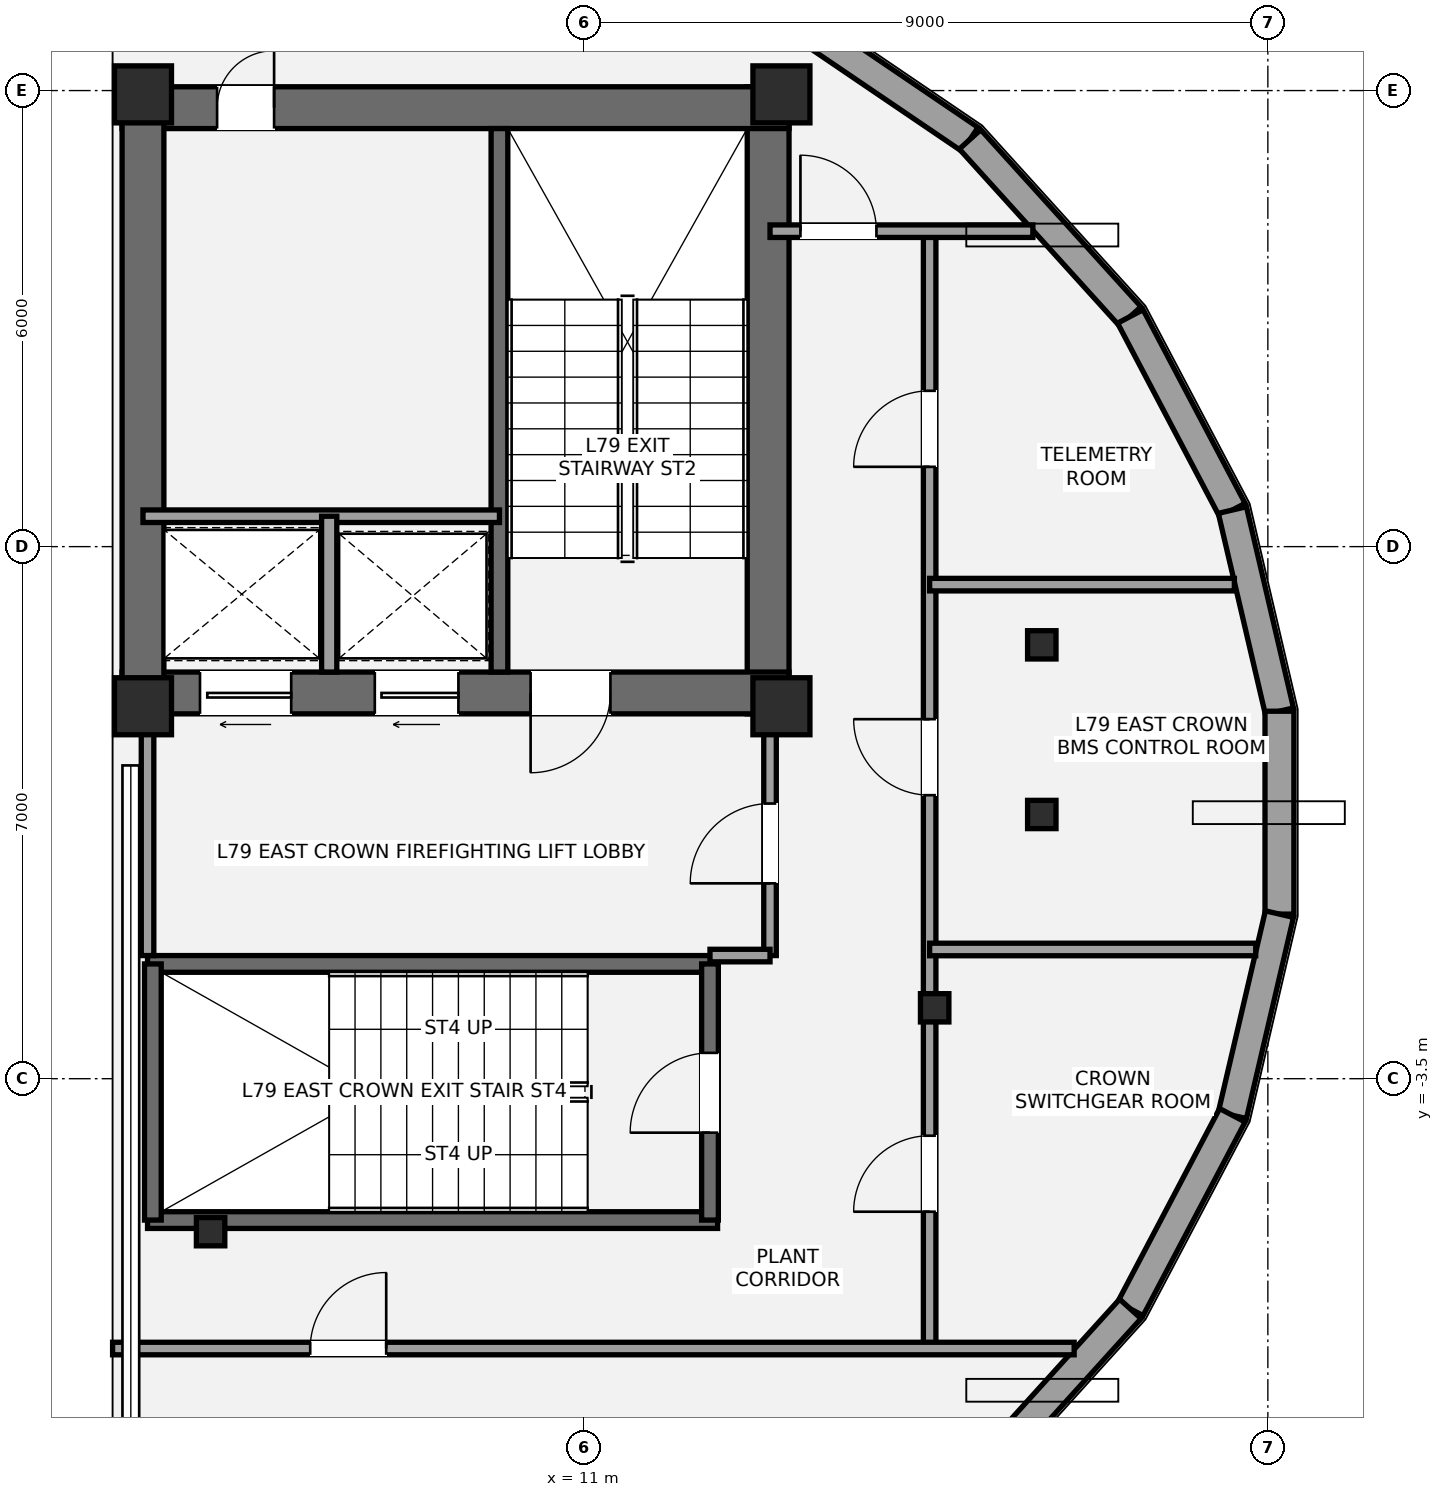
"""IFC4 building model, lengths in metres.
Left out: names, types, materials, properties, quantities, classifications, styles, units other than length and angle.
Written with IfcOpenShell. Run it as: python <this file> out.ifc"""

import sys

from ifc_helpers import new_model, si_unit, direction, frame, frame_2d, origin, origin_2d, place, context, subcontext, project, spatial, rectangle, i_section, extrude, element, fill, save


model = new_model("IFC4")
c1 = context("Model", 3, precision=1e-05, world=origin(), true_north=direction((0.0, 1.0)))
c2 = subcontext(c1, "Body", "Model", "MODEL_VIEW")
j1 = project(units=[si_unit("LENGTHUNIT", "METRE"), si_unit("PLANEANGLEUNIT", "RADIAN")], contexts=[c1])
p1 = place(None, origin())
s1 = spatial("IfcSite", under=j1, at=p1, CompositionType="ELEMENT")
p2 = place(p1, origin())
s2 = spatial("IfcBuilding", under=s1, at=p2, CompositionType="ELEMENT")
p3 = place(p2, frame((0.0, 0.0, 280.6)))
s3 = spatial("IfcBuildingStorey", under=s2, at=p3, CompositionType="ELEMENT", Elevation=280.6)
p4 = place(p3, frame((13.425, 1.3, 0.0), z_axis=(0.0, 0.0, 1.0), x_axis=(0.0, 1.0, 0.0)))
e1 = element("IfcWall", 1, at=p4, inside=s3, PredefinedType="SHEAR", context=c2, shape_type="SweptSolid", body=[
    extrude(rectangle(XDim=8.25, YDim=0.55, at=frame_2d((4.125, 0.0))), origin(), (0.0, 0.0, 1.0), 3.8),
])
p5 = place(p3, frame((4.925, 9.275, 0.0), z_axis=(0.0, 0.0, 1.0), x_axis=(1.0, 0.0, 0.0)))
e2 = element("IfcWall", 2, at=p5, inside=s3, PredefinedType="SHEAR", context=c2, shape_type="SweptSolid", body=[
    extrude(rectangle(XDim=8.775, YDim=0.55, at=frame_2d((4.387, 0.0))), origin(), (0.0, 0.0, 1.0), 3.8),
])
p6 = place(p5, frame((1.25, 0.0, 0.0)))
e3 = element("IfcOpeningElement", 3, at=p6, cuts=e2, PredefinedType="OPENING", context=c2, shape_type="SweptSolid", body=[
    extrude(rectangle(XDim=0.75, YDim=2.1, at=frame_2d((0.375, 1.05))), frame((0.0, 0.285, 0.0), z_axis=(0.0, -1.0, 0.0), x_axis=(1.0, 0.0, 0.0)), (0.0, 0.0, 1.0), 0.57),
])
p7 = place(p3, frame((13.7, 1.575, 0.0), z_axis=(0.0, 0.0, 1.0), x_axis=(-1.0, 0.0, 0.0)))
e4 = element("IfcWall", 4, at=p7, inside=s3, PredefinedType="SHEAR", context=c2, shape_type="SweptSolid", body=[
    extrude(rectangle(XDim=8.775, YDim=0.55, at=frame_2d((4.387, 0.0))), origin(), (0.0, 0.0, 1.0), 3.8),
])
p8 = place(p7, frame((2.35, 0.0, 0.0)))
e5 = element("IfcOpeningElement", 5, at=p8, cuts=e4, PredefinedType="OPENING", context=c2, shape_type="SweptSolid", body=[
    extrude(rectangle(XDim=1.05, YDim=2.15, at=frame_2d((0.525, 1.075))), frame((0.0, 0.285, 0.0), z_axis=(0.0, -1.0, 0.0), x_axis=(1.0, 0.0, 0.0)), (0.0, 0.0, 1.0), 0.57),
])
p9 = place(p7, frame((6.55, 0.0, 0.0)))
e6 = element("IfcOpeningElement", 6, at=p9, cuts=e4, PredefinedType="OPENING", context=c2, shape_type="SweptSolid", body=[
    extrude(rectangle(XDim=1.2, YDim=2.2, at=frame_2d((0.6, 1.1))), frame((0.0, 0.285, 0.0), z_axis=(0.0, -1.0, 0.0), x_axis=(1.0, 0.0, 0.0)), (0.0, 0.0, 1.0), 0.57),
])
p10 = place(p7, frame((4.35, 0.0, 0.0)))
e7 = element("IfcOpeningElement", 7, at=p10, cuts=e4, PredefinedType="OPENING", context=c2, shape_type="SweptSolid", body=[
    extrude(rectangle(XDim=1.1, YDim=2.2, at=frame_2d((0.55, 1.1))), frame((0.0, 0.285, 0.0), z_axis=(0.0, -1.0, 0.0), x_axis=(1.0, 0.0, 0.0)), (0.0, 0.0, 1.0), 0.57),
])
p11 = place(p3, frame((5.2, 1.3, 0.0), z_axis=(0.0, 0.0, 1.0), x_axis=(0.0, 1.0, 0.0)))
e8 = element("IfcWall", 8, at=p11, inside=s3, PredefinedType="SHEAR", context=c2, shape_type="SweptSolid", body=[
    extrude(rectangle(XDim=8.25, YDim=0.55, at=frame_2d((4.125, 0.0))), origin(), (0.0, 0.0, 1.0), 3.8),
])
p12 = place(p3, frame((9.89, 1.85, 0.0), z_axis=(0.0, 0.0, 1.0), x_axis=(0.0, 1.0, 0.0)))
e9 = element("IfcWall", 9, at=p12, inside=s3, PredefinedType="SHEAR", context=c2, shape_type="SweptSolid", body=[
    extrude(rectangle(XDim=7.15, YDim=0.22, at=frame_2d((3.575, 0.0))), origin(), (0.0, 0.0, 1.0), 3.8),
])
for number, where, z_axis, x_axis in (
    (10, (5.26, -1.99, 0.0), (0.0, 0.0, 1.0), (1.0, 0.0, 0.0)),
    (11, (5.26, -5.36, 0.0), (0.0, 0.0, 1.0), (1.0, 0.0, 0.0)),
):
    element("IfcWall", number, at=place(p3, frame(where, z_axis=z_axis, x_axis=x_axis)), inside=s3, PredefinedType="SHEAR", context=c2, shape_type="SweptSolid", body=[
        extrude(rectangle(XDim=7.5, YDim=0.22, at=frame_2d((3.75, 0.0))), origin(), (0.0, 0.0, 1.0), 3.8),
    ])
p13 = place(p3, frame((5.33, -5.36, 0.0), z_axis=(0.0, 0.0, 1.0), x_axis=(0.0, 1.0, 0.0)))
e12 = element("IfcWall", 12, at=p13, inside=s3, PredefinedType="SHEAR", context=c2, shape_type="SweptSolid", body=[
    extrude(rectangle(XDim=3.37, YDim=0.22, at=frame_2d((1.685, 0.0))), origin(), (0.0, 0.0, 1.0), 3.8),
])
p14 = place(p3, frame((12.66, -5.36, 0.0), z_axis=(0.0, 0.0, 1.0), x_axis=(0.0, 1.0, 0.0)))
e13 = element("IfcWall", 13, at=p14, inside=s3, PredefinedType="SHEAR", context=c2, shape_type="SweptSolid", body=[
    extrude(rectangle(XDim=3.37, YDim=0.22, at=frame_2d((1.685, 0.0))), origin(), (0.0, 0.0, 1.0), 3.8),
])
p15 = place(p14, frame((1.15, 0.0, 0.0)))
e14 = element("IfcOpeningElement", 14, at=p15, cuts=e13, PredefinedType="OPENING", context=c2, shape_type="SweptSolid", body=[
    extrude(rectangle(XDim=1.05, YDim=2.15, at=frame_2d((0.525, 1.075))), frame((0.0, 0.12, 0.0), z_axis=(0.0, -1.0, 0.0), x_axis=(1.0, 0.0, 0.0)), (0.0, 0.0, 1.0), 0.24),
])
for number, where, z_axis, x_axis in (
    (15, (5.2, 1.4, 0.0), (0.0, 0.0, 1.0), (1.0, 0.0, 0.0)),
    (16, (5.2, 9.45, 0.0), (0.0, 0.0, 1.0), (1.0, 0.0, 0.0)),
    (17, (13.6, 1.4, 0.0), (0.0, 0.0, 1.0), (1.0, 0.0, 0.0)),
    (18, (13.6, 9.45, 0.0), (0.0, 0.0, 1.0), (1.0, 0.0, 0.0)),
):
    element("IfcColumn", number, at=place(p3, frame(where, z_axis=z_axis, x_axis=x_axis)), inside=s3, PredefinedType="PILASTER", context=c2, shape_type="SweptSolid", body=[
        extrude(rectangle(XDim=0.75, YDim=0.75, at=origin_2d()), origin(), (0.0, 0.0, 1.0), 3.8),
    ])
for number, where, z_axis, x_axis in (
    (19, (17.026, 2.208, 0.0), (0.0, 0.0, 1.0), (1.0, 0.0, 0.0)),
    (20, (6.09, -5.513, 0.0), (0.0, 0.0, 1.0), (1.0, 0.0, 0.0)),
    (21, (15.616, -2.567, 0.0), (0.0, 0.0, 1.0), (1.0, 0.0, 0.0)),
    (22, (17.026, -0.024, 0.0), (0.0, 0.0, 1.0), (1.0, 0.0, 0.0)),
):
    element("IfcColumn", number, at=place(p3, frame(where, z_axis=z_axis, x_axis=x_axis)), inside=s3, PredefinedType="COLUMN", context=c2, shape_type="SweptSolid", body=[
        extrude(i_section(OverallWidth=0.374, OverallDepth=0.372, WebThickness=0.016, FlangeThickness=0.026, at=origin_2d()), origin(), (0.0, 0.0, 1.0), 3.8),
    ])
p16 = place(p3, frame((16.082, 8.858, 0.0), z_axis=(0.0, 0.0, 1.0), x_axis=(-0.827591474152, 0.561330875608, 0.0)))
e23 = element("IfcWall", 23, at=p16, inside=s3, PredefinedType="ELEMENTEDWALL", context=c2, shape_type="SweptSolid", body=[
    extrude(rectangle(XDim=3.466, YDim=0.38, at=frame_2d((1.733, 0.0))), origin(), (0.0, 0.0, 1.0), 2.97),
])
p17 = place(p3, frame((18.191, 6.529, 0.0), z_axis=(0.0, 0.0, 1.0), x_axis=(-0.671159432859, 0.741313034881, 0.0)))
e24 = element("IfcWall", 24, at=p17, inside=s3, PredefinedType="ELEMENTEDWALL", context=c2, shape_type="SweptSolid", body=[
    extrude(rectangle(XDim=3.143, YDim=0.38, at=frame_2d((1.571, 0.0))), origin(), (0.0, 0.0, 1.0), 2.97),
])
p18 = place(p3, frame((19.533, 3.981, 0.0), z_axis=(0.0, 0.0, 1.0), x_axis=(-0.466239076721, 0.884658760957, 0.0)))
e25 = element("IfcWall", 25, at=p18, inside=s3, PredefinedType="ELEMENTEDWALL", context=c2, shape_type="SweptSolid", body=[
    extrude(rectangle(XDim=2.879, YDim=0.38, at=frame_2d((1.44, 0.0))), origin(), (0.0, 0.0, 1.0), 2.97),
])
p19 = place(p3, frame((20.152, 1.335, 0.0), z_axis=(0.0, 0.0, 1.0), x_axis=(-0.227797493786, 0.973708530221, 0.0)))
e26 = element("IfcWall", 26, at=p19, inside=s3, PredefinedType="ELEMENTEDWALL", context=c2, shape_type="SweptSolid", body=[
    extrude(rectangle(XDim=2.718, YDim=0.38, at=frame_2d((1.359, 0.0))), origin(), (0.0, 0.0, 1.0), 2.97),
])
p20 = place(p3, frame((20.152, -1.335, 0.0), z_axis=(0.0, 0.0, 1.0), x_axis=(0.0, 1.0, 0.0)))
e27 = element("IfcWall", 27, at=p20, inside=s3, PredefinedType="ELEMENTEDWALL", context=c2, shape_type="SweptSolid", body=[
    extrude(rectangle(XDim=2.669, YDim=0.38, at=frame_2d((1.335, 0.0))), origin(), (0.0, 0.0, 1.0), 2.97),
])
p21 = place(p3, frame((19.533, -3.981, 0.0), z_axis=(0.0, 0.0, 1.0), x_axis=(0.227797493786, 0.973708530221, 0.0)))
e28 = element("IfcWall", 28, at=p21, inside=s3, PredefinedType="ELEMENTEDWALL", context=c2, shape_type="SweptSolid", body=[
    extrude(rectangle(XDim=2.718, YDim=0.38, at=frame_2d((1.359, 0.0))), origin(), (0.0, 0.0, 1.0), 2.97),
])
p22 = place(p3, frame((18.191, -6.529, 0.0), z_axis=(0.0, 0.0, 1.0), x_axis=(0.466239076721, 0.884658760957, 0.0)))
e29 = element("IfcWall", 29, at=p22, inside=s3, PredefinedType="ELEMENTEDWALL", context=c2, shape_type="SweptSolid", body=[
    extrude(rectangle(XDim=2.879, YDim=0.38, at=frame_2d((1.44, 0.0))), origin(), (0.0, 0.0, 1.0), 2.97),
])
p23 = place(p3, frame((16.082, -8.858, 0.0), z_axis=(0.0, 0.0, 1.0), x_axis=(0.671159432859, 0.741313034881, 0.0)))
e30 = element("IfcWall", 30, at=p23, inside=s3, PredefinedType="ELEMENTEDWALL", context=c2, shape_type="SweptSolid", body=[
    extrude(rectangle(XDim=3.143, YDim=0.38, at=frame_2d((1.571, 0.0))), origin(), (0.0, 0.0, 1.0), 2.97),
])
p24 = place(p3, frame((5.2, 3.9, 0.0), z_axis=(0.0, 0.0, 1.0), x_axis=(1.0, 0.0, 0.0)))
e31 = element("IfcWall", 31, at=p24, inside=s3, PredefinedType="PARTITIONING", context=c2, shape_type="SweptSolid", body=[
    extrude(rectangle(XDim=4.69, YDim=0.165, at=frame_2d((2.345, 0.0))), origin(), (0.0, 0.0, 1.0), 3.6),
])
p25 = place(p3, frame((7.65, 1.85, 0.0), z_axis=(0.0, 0.0, 1.0), x_axis=(0.0, 1.0, 0.0)))
e32 = element("IfcWall", 32, at=p25, inside=s3, PredefinedType="SOLIDWALL", context=c2, shape_type="SweptSolid", body=[
    extrude(rectangle(XDim=2.05, YDim=0.2, at=frame_2d((1.025, 0.0))), origin(), (0.0, 0.0, 1.0), 3.6),
])
p26 = place(p3, frame((5.26, -1.88, 0.0), z_axis=(0.0, 0.0, 1.0), x_axis=(0.0, 1.0, 0.0)))
e33 = element("IfcWall", 33, at=p26, inside=s3, PredefinedType="PARTITIONING", context=c2, shape_type="SweptSolid", body=[
    extrude(rectangle(XDim=3.23, YDim=0.165, at=frame_2d((1.615, 0.0))), origin(), (0.0, 0.0, 1.0), 3.6),
])
p27 = place(p3, frame((13.45, -1.88, 0.0), z_axis=(0.0, 0.0, 1.0), x_axis=(0.0, 1.0, 0.0)))
e34 = element("IfcWall", 34, at=p27, inside=s3, PredefinedType="PARTITIONING", context=c2, shape_type="SweptSolid", body=[
    extrude(rectangle(XDim=3.23, YDim=0.165, at=frame_2d((1.615, 0.0))), origin(), (0.0, 0.0, 1.0), 3.061),
])
p28 = place(p27, frame((0.95, 0.0, 0.0)))
e35 = element("IfcOpeningElement", 35, at=p28, cuts=e34, PredefinedType="OPENING", context=c2, shape_type="SweptSolid", body=[
    extrude(rectangle(XDim=1.05, YDim=2.15, at=frame_2d((0.525, 1.075))), frame((0.0, 0.093, 0.0), z_axis=(0.0, -1.0, 0.0), x_axis=(1.0, 0.0, 0.0)), (0.0, 0.0, 1.0), 0.185),
])
p29 = place(p3, frame((12.66, -1.88, 0.0), z_axis=(0.0, 0.0, 1.0), x_axis=(1.0, 0.0, 0.0)))
e36 = element("IfcWall", 36, at=p29, inside=s3, PredefinedType="PARTITIONING", context=c2, shape_type="SweptSolid", body=[
    extrude(rectangle(XDim=0.79, YDim=0.165, at=frame_2d((0.395, 0.0))), origin(), (0.0, 0.0, 1.0), 3.061),
])
p30 = place(p3, frame((15.55, -7.05, 0.0), z_axis=(0.0, 0.0, 1.0), x_axis=(0.0, 1.0, 0.0)))
e37 = element("IfcWall", 37, at=p30, inside=s3, PredefinedType="PARTITIONING", context=c2, shape_type="SweptSolid", body=[
    extrude(rectangle(XDim=14.7, YDim=0.165, at=frame_2d((7.35, 0.0))), origin(), (0.0, 0.0, 1.0), 2.987),
])
p31 = place(p30, frame((1.8, 0.0, 0.0)))
e38 = element("IfcOpeningElement", 38, at=p31, cuts=e37, PredefinedType="OPENING", context=c2, shape_type="SweptSolid", body=[
    extrude(rectangle(XDim=1.0, YDim=2.15, at=frame_2d((0.5, 1.075))), frame((0.0, 0.093, 0.0), z_axis=(0.0, -1.0, 0.0), x_axis=(1.0, 0.0, 0.0)), (0.0, 0.0, 1.0), 0.185),
])
p32 = place(p30, frame((7.28, 0.0, 0.0)))
e39 = element("IfcOpeningElement", 39, at=p32, cuts=e37, PredefinedType="OPENING", context=c2, shape_type="SweptSolid", body=[
    extrude(rectangle(XDim=1.0, YDim=2.15, at=frame_2d((0.5, 1.075))), frame((0.0, 0.093, 0.0), z_axis=(0.0, -1.0, 0.0), x_axis=(1.0, 0.0, 0.0)), (0.0, 0.0, 1.0), 0.185),
])
p33 = place(p30, frame((11.6, 0.0, 0.0)))
e40 = element("IfcOpeningElement", 40, at=p33, cuts=e37, PredefinedType="OPENING", context=c2, shape_type="SweptSolid", body=[
    extrude(rectangle(XDim=1.0, YDim=2.15, at=frame_2d((0.5, 1.075))), frame((0.0, 0.093, 0.0), z_axis=(0.0, -1.0, 0.0), x_axis=(1.0, 0.0, 0.0)), (0.0, 0.0, 1.0), 0.185),
])
p34 = place(p3, frame((4.8, -7.05, 0.0), z_axis=(0.0, 0.0, 1.0), x_axis=(1.0, 0.0, 0.0)))
e41 = element("IfcWall", 41, at=p34, inside=s3, PredefinedType="PARTITIONING", context=c2, shape_type="SweptSolid", body=[
    extrude(rectangle(XDim=12.651, YDim=0.165, at=frame_2d((6.326, 0.0))), origin(), (0.0, 0.0, 1.0), 2.968),
])
p35 = place(p34, frame((2.6, 0.0, 0.0)))
e42 = element("IfcOpeningElement", 42, at=p35, cuts=e41, PredefinedType="OPENING", context=c2, shape_type="SweptSolid", body=[
    extrude(rectangle(XDim=1.0, YDim=2.15, at=frame_2d((0.5, 1.075))), frame((0.0, 0.093, 0.0), z_axis=(0.0, -1.0, 0.0), x_axis=(1.0, 0.0, 0.0)), (0.0, 0.0, 1.0), 0.185),
])
p36 = place(p3, frame((13.45, 7.65, 0.0), z_axis=(0.0, 0.0, 1.0), x_axis=(1.0, 0.0, 0.0)))
e43 = element("IfcWall", 43, at=p36, inside=s3, PredefinedType="PARTITIONING", context=c2, shape_type="SweptSolid", body=[
    extrude(rectangle(XDim=3.458, YDim=0.165, at=frame_2d((1.729, 0.0))), origin(), (0.0, 0.0, 1.0), 2.968),
])
p37 = place(p36, frame((0.4, 0.0, 0.0)))
e44 = element("IfcOpeningElement", 44, at=p37, cuts=e43, PredefinedType="OPENING", context=c2, shape_type="SweptSolid", body=[
    extrude(rectangle(XDim=1.0, YDim=2.15, at=frame_2d((0.5, 1.075))), frame((0.0, 0.093, 0.0), z_axis=(0.0, -1.0, 0.0), x_axis=(1.0, 0.0, 0.0)), (0.0, 0.0, 1.0), 0.185),
])
p38 = place(p3, frame((15.55, -1.8, 0.0), z_axis=(0.0, 0.0, 1.0), x_axis=(1.0, 0.0, 0.0)))
e45 = element("IfcWall", 45, at=p38, inside=s3, PredefinedType="PARTITIONING", context=c2, shape_type="SweptSolid", body=[
    extrude(rectangle(XDim=4.29, YDim=0.165, at=frame_2d((2.145, 0.0))), origin(), (0.0, 0.0, 1.0), 3.061),
])
p39 = place(p3, frame((15.55, 3.0, 0.0), z_axis=(0.0, 0.0, 1.0), x_axis=(1.0, 0.0, 0.0)))
e46 = element("IfcWall", 46, at=p39, inside=s3, PredefinedType="PARTITIONING", context=c2, shape_type="SweptSolid", body=[
    extrude(rectangle(XDim=4.01, YDim=0.165, at=frame_2d((2.005, 0.0))), origin(), (0.0, 0.0, 1.0), 3.061),
])
p40 = place(p28, origin())
e47 = element("IfcDoor", 47, at=p40, inside=s3, OperationType="SINGLE_SWING_LEFT", PredefinedType="DOOR", context=c2, shape_type="SweptSolid", body=[
    extrude(rectangle(XDim=1.05, YDim=2.15, at=frame_2d((0.525, 1.075))), frame((0.0, 0.025, 0.0), z_axis=(0.0, -1.0, 0.0), x_axis=(1.0, 0.0, 0.0)), (0.0, 0.0, 1.0), 0.05),
])
fill(e35, e47)
p41 = place(p8, origin())
e48 = element("IfcDoor", 48, at=p41, inside=s3, OperationType="SINGLE_SWING_RIGHT", PredefinedType="DOOR", context=c2, shape_type="SweptSolid", body=[
    extrude(rectangle(XDim=1.05, YDim=2.15, at=frame_2d((0.525, 1.075))), frame((0.0, 0.025, 0.0), z_axis=(0.0, -1.0, 0.0), x_axis=(1.0, 0.0, 0.0)), (0.0, 0.0, 1.0), 0.05),
])
fill(e5, e48)
p42 = place(p15, origin())
e49 = element("IfcDoor", 49, at=p42, inside=s3, OperationType="SINGLE_SWING_LEFT", PredefinedType="DOOR", context=c2, shape_type="SweptSolid", body=[
    extrude(rectangle(XDim=1.05, YDim=2.15, at=frame_2d((0.525, 1.075))), frame((0.0, 0.025, 0.0), z_axis=(0.0, -1.0, 0.0), x_axis=(1.0, 0.0, 0.0)), (0.0, 0.0, 1.0), 0.05),
])
fill(e14, e49)
p43 = place(p6, origin())
e50 = element("IfcDoor", 50, at=p43, inside=s3, OperationType="SINGLE_SWING_RIGHT", PredefinedType="DOOR", context=c2, shape_type="SweptSolid", body=[
    extrude(rectangle(XDim=0.75, YDim=2.1, at=frame_2d((0.375, 1.05))), frame((0.0, 0.025, 0.0), z_axis=(0.0, -1.0, 0.0), x_axis=(1.0, 0.0, 0.0)), (0.0, 0.0, 1.0), 0.05),
])
fill(e3, e50)
p44 = place(p9, origin())
e51 = element("IfcDoor", 51, at=p44, inside=s3, OperationType="SLIDING_TO_RIGHT", PredefinedType="DOOR", context=c2, shape_type="SweptSolid", body=[
    extrude(rectangle(XDim=1.2, YDim=2.2, at=frame_2d((0.6, 1.1))), frame((0.0, 0.025, 0.0), z_axis=(0.0, -1.0, 0.0), x_axis=(1.0, 0.0, 0.0)), (0.0, 0.0, 1.0), 0.05),
])
fill(e6, e51)
p45 = place(p10, origin())
e52 = element("IfcDoor", 52, at=p45, inside=s3, OperationType="SLIDING_TO_LEFT", PredefinedType="DOOR", context=c2, shape_type="SweptSolid", body=[
    extrude(rectangle(XDim=1.1, YDim=2.2, at=frame_2d((0.55, 1.1))), frame((0.0, 0.025, 0.0), z_axis=(0.0, -1.0, 0.0), x_axis=(1.0, 0.0, 0.0)), (0.0, 0.0, 1.0), 0.05),
])
fill(e7, e52)
p46 = place(p37, origin())
e53 = element("IfcDoor", 53, at=p46, inside=s3, OperationType="SINGLE_SWING_LEFT", PredefinedType="DOOR", context=c2, shape_type="SweptSolid", body=[
    extrude(rectangle(XDim=1.0, YDim=2.15, at=frame_2d((0.5, 1.075))), frame((0.0, 0.025, 0.0), z_axis=(0.0, -1.0, 0.0), x_axis=(1.0, 0.0, 0.0)), (0.0, 0.0, 1.0), 0.05),
])
fill(e44, e53)
p47 = place(p35, origin())
e54 = element("IfcDoor", 54, at=p47, inside=s3, OperationType="SINGLE_SWING_RIGHT", PredefinedType="DOOR", context=c2, shape_type="SweptSolid", body=[
    extrude(rectangle(XDim=1.0, YDim=2.15, at=frame_2d((0.5, 1.075))), frame((0.0, 0.025, 0.0), z_axis=(0.0, -1.0, 0.0), x_axis=(1.0, 0.0, 0.0)), (0.0, 0.0, 1.0), 0.05),
])
fill(e42, e54)
p48 = place(p31, origin())
e55 = element("IfcDoor", 55, at=p48, inside=s3, OperationType="SINGLE_SWING_LEFT", PredefinedType="DOOR", context=c2, shape_type="SweptSolid", body=[
    extrude(rectangle(XDim=1.0, YDim=2.15, at=frame_2d((0.5, 1.075))), frame((0.0, 0.025, 0.0), z_axis=(0.0, -1.0, 0.0), x_axis=(1.0, 0.0, 0.0)), (0.0, 0.0, 1.0), 0.05),
])
fill(e38, e55)
p49 = place(p32, origin())
e56 = element("IfcDoor", 56, at=p49, inside=s3, OperationType="SINGLE_SWING_RIGHT", PredefinedType="DOOR", context=c2, shape_type="SweptSolid", body=[
    extrude(rectangle(XDim=1.0, YDim=2.15, at=frame_2d((0.5, 1.075))), frame((0.0, 0.025, 0.0), z_axis=(0.0, -1.0, 0.0), x_axis=(1.0, 0.0, 0.0)), (0.0, 0.0, 1.0), 0.05),
])
fill(e39, e56)
p50 = place(p33, origin())
e57 = element("IfcDoor", 57, at=p50, inside=s3, OperationType="SINGLE_SWING_LEFT", PredefinedType="DOOR", context=c2, shape_type="SweptSolid", body=[
    extrude(rectangle(XDim=1.0, YDim=2.15, at=frame_2d((0.5, 1.075))), frame((0.0, 0.025, 0.0), z_axis=(0.0, -1.0, 0.0), x_axis=(1.0, 0.0, 0.0)), (0.0, 0.0, 1.0), 0.05),
])
fill(e40, e57)
save(model, sys.argv[1])
